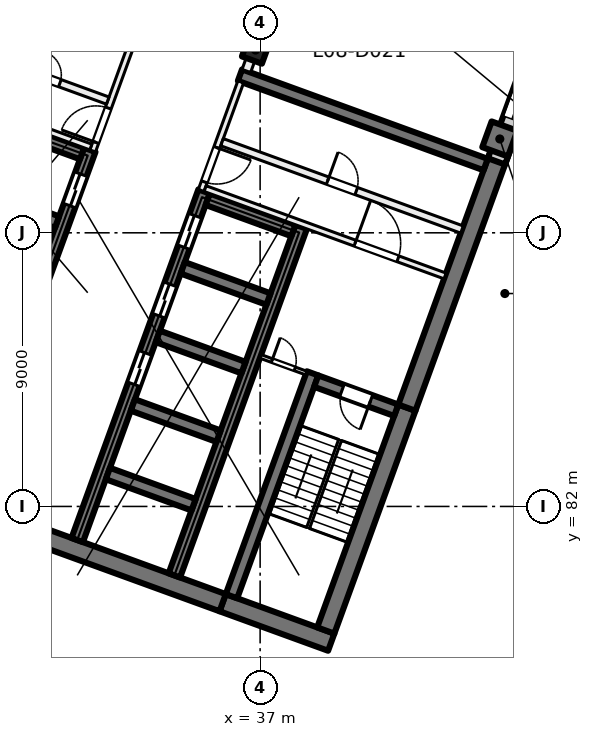
"""IFC4 building model, lengths in metres.
Left out: names, types, materials, properties, quantities, classifications, styles, units other than length and angle.
Written with IfcOpenShell. Run it as: python <this file> out.ifc"""

import sys

from ifc_helpers import new_model, si_unit, direction, frame, frame_2d, origin, origin_2d, place, context, subcontext, project, spatial, rectangle, extrude, element, fill, save


model = new_model("IFC4")
c1 = context("Model", 3, precision=1e-05, world=origin(), true_north=direction((0.0, 1.0)))
c2 = subcontext(c1, "Body", "Model", "MODEL_VIEW")
j1 = project(units=[si_unit("LENGTHUNIT", "METRE"), si_unit("PLANEANGLEUNIT", "RADIAN")], contexts=[c1])
p1 = place(None, origin())
s1 = spatial("IfcSite", under=j1, at=p1, CompositionType="ELEMENT")
p2 = place(p1, origin())
s2 = spatial("IfcBuilding", under=s1, at=p2, CompositionType="ELEMENT")
p3 = place(p2, frame((0.0, 0.0, 39.5)))
s3 = spatial("IfcBuildingStorey", under=s2, at=p3, CompositionType="ELEMENT", Elevation=39.5)
p4 = place(p3, frame((36.849, 97.011, 0.0), z_axis=(0.0, 0.0, 1.0), x_axis=(-0.342020143326, -0.939692620786, 0.0)))
e1 = element("IfcColumn", 1, at=p4, inside=s3, PredefinedType="COLUMN", context=c2, shape_type="SweptSolid", body=[
    extrude(rectangle(XDim=0.7, YDim=0.7, at=origin_2d()), origin(), (0.0, 0.0, 1.0), 4.0),
])
p5 = place(p3, frame((44.884, 94.087, 0.0), z_axis=(0.0, 0.0, 1.0), x_axis=(-0.342020143326, -0.939692620786, 0.0)))
e2 = element("IfcColumn", 2, at=p5, inside=s3, PredefinedType="COLUMN", context=c2, shape_type="SweptSolid", body=[
    extrude(rectangle(XDim=0.9, YDim=0.9, at=origin_2d()), origin(), (0.0, 0.0, 1.0), 4.0),
])
p6 = place(p3, frame((39.338, 77.535, 0.0), z_axis=(0.0, 0.0, 1.0), x_axis=(-0.939701471648, 0.341995824804, 0.0)))
e3 = element("IfcWall", 3, at=p6, inside=s3, PredefinedType="SHEAR", context=c2, shape_type="SweptSolid", body=[
    extrude(rectangle(XDim=3.8, YDim=0.6, at=frame_2d((1.9, 0.0))), origin(), (0.0, 0.0, 1.0), 4.0),
])
p7 = place(p3, frame((35.767, 78.835, 0.0), z_axis=(0.0, 0.0, 1.0), x_axis=(-0.939692894512, 0.342019391267, 0.0)))
e4 = element("IfcWall", 4, at=p7, inside=s3, PredefinedType="SHEAR", context=c2, shape_type="SweptSolid", body=[
    extrude(rectangle(XDim=14.4, YDim=0.6, at=frame_2d((7.2, 0.0))), origin(), (0.0, 0.0, 1.0), 4.0),
])
p8 = place(p3, frame((39.159, 77.92, 0.0), z_axis=(0.0, 0.0, 1.0), x_axis=(0.342016982193, 0.939693771338, 0.0)))
e5 = element("IfcWall", 5, at=p8, inside=s3, PredefinedType="SHEAR", context=c2, shape_type="SweptSolid", body=[
    extrude(rectangle(XDim=7.8, YDim=0.6, at=frame_2d((3.9, 0.0))), origin(), (0.0, 0.0, 1.0), 4.0),
])
p9 = place(p3, frame((41.827, 85.249, 0.0), z_axis=(0.0, 0.0, 1.0), x_axis=(0.342016162452, 0.939694069696, 0.0)))
e6 = element("IfcWall", 6, at=p9, inside=s3, PredefinedType="SHEAR", context=c2, shape_type="SweptSolid", body=[
    extrude(rectangle(XDim=8.9, YDim=0.6, at=frame_2d((4.45, 0.0))), origin(), (0.0, 0.0, 1.0), 4.0),
])
p10 = place(p3, frame((36.058, 79.048, 0.0), z_axis=(0.0, 0.0, 1.0), x_axis=(0.342016982193, 0.939693771338, 0.0)))
e7 = element("IfcWall", 7, at=p10, inside=s3, PredefinedType="SHEAR", context=c2, shape_type="SweptSolid", body=[
    extrude(rectangle(XDim=7.8, YDim=0.4, at=frame_2d((3.9, 0.0))), origin(), (0.0, 0.0, 1.0), 4.0),
])
p11 = place(p3, frame((41.476, 85.164, 0.0), z_axis=(0.0, 0.0, 1.0), x_axis=(-0.939678810556, 0.342058084236, 0.0)))
e8 = element("IfcWall", 8, at=p11, inside=s3, PredefinedType="SHEAR", context=c2, shape_type="SweptSolid", body=[
    extrude(rectangle(XDim=2.8, YDim=0.4, at=frame_2d((1.4, 0.0))), origin(), (0.0, 0.0, 1.0), 4.0),
])
p12 = place(p11, frame((0.9, 0.0, 0.0)))
e9 = element("IfcOpeningElement", 9, at=p12, cuts=e8, PredefinedType="OPENING", context=c2, shape_type="SweptSolid", body=[
    extrude(rectangle(XDim=1.0, YDim=2.1, at=frame_2d((0.5, 1.05))), frame((0.0, 0.21, 0.0), z_axis=(0.0, -1.0, 0.0), x_axis=(1.0, 0.0, 0.0)), (0.0, 0.0, 1.0), 0.42),
])
p13 = place(p3, frame((30.984, 80.895, 0.0), z_axis=(0.0, 0.0, 1.0), x_axis=(0.342021021735, 0.939692301071, 0.0)))
e10 = element("IfcWall", 10, at=p13, inside=s3, PredefinedType="SHEAR", context=c2, shape_type="SweptSolid", body=[
    extrude(rectangle(XDim=12.2, YDim=0.4, at=frame_2d((6.1, 0.0))), origin(), (0.0, 0.0, 1.0), 4.0),
])
p14 = place(p13, frame((5.45, 0.0, 0.0)))
e11 = element("IfcOpeningElement", 11, at=p14, cuts=e10, PredefinedType="OPENING", context=c2, shape_type="SweptSolid", body=[
    extrude(rectangle(XDim=1.1, YDim=2.1, at=frame_2d((0.55, 1.05))), frame((0.0, 0.21, 0.0), z_axis=(0.0, -1.0, 0.0), x_axis=(1.0, 0.0, 0.0)), (0.0, 0.0, 1.0), 0.42),
])
p15 = place(p13, frame((7.85, 0.0, 0.0)))
e12 = element("IfcOpeningElement", 12, at=p15, cuts=e10, PredefinedType="OPENING", context=c2, shape_type="SweptSolid", body=[
    extrude(rectangle(XDim=1.1, YDim=2.1, at=frame_2d((0.55, 1.05))), frame((0.0, 0.21, 0.0), z_axis=(0.0, -1.0, 0.0), x_axis=(1.0, 0.0, 0.0)), (0.0, 0.0, 1.0), 0.42),
])
p16 = place(p13, frame((10.25, 0.0, 0.0)))
e13 = element("IfcOpeningElement", 13, at=p16, cuts=e10, PredefinedType="OPENING", context=c2, shape_type="SweptSolid", body=[
    extrude(rectangle(XDim=1.1, YDim=2.1, at=frame_2d((0.55, 1.05))), frame((0.0, 0.21, 0.0), z_axis=(0.0, -1.0, 0.0), x_axis=(1.0, 0.0, 0.0)), (0.0, 0.0, 1.0), 0.42),
])
p17 = place(p3, frame((34.178, 79.732, 0.0), z_axis=(0.0, 0.0, 1.0), x_axis=(0.342014590177, 0.939694641948, 0.0)))
e14 = element("IfcWall", 14, at=p17, inside=s3, PredefinedType="SHEAR", context=c2, shape_type="SweptSolid", body=[
    extrude(rectangle(XDim=12.2, YDim=0.4, at=frame_2d((6.1, 0.0))), origin(), (0.0, 0.0, 1.0), 4.0),
])
for number, where, z_axis, x_axis in (
    (15, (34.812, 82.056, 0.0), (0.0, 0.0, 1.0), (-0.94, 0.342, 0.0)),
    (16, (35.632, 84.311, 0.0), (0.0, 0.0, 1.0), (-0.94, 0.342, 0.0)),
    (17, (36.453, 86.566, 0.0), (0.0, 0.0, 1.0), (-0.94, 0.342, 0.0)),
    (18, (37.274, 88.822, 0.0), (0.0, 0.0, 1.0), (-0.94, 0.342, 0.0)),
):
    element("IfcWall", number, at=place(p3, frame(where, z_axis=z_axis, x_axis=x_axis)), inside=s3, PredefinedType="SHEAR", context=c2, shape_type="SweptSolid", body=[
        extrude(rectangle(XDim=3.0, YDim=0.4, at=frame_2d((1.5, 0.0))), origin(), (0.0, 0.0, 1.0), 4.0),
    ])
p18 = place(p3, frame((38.095, 91.077, 0.0), z_axis=(0.0, 0.0, 1.0), x_axis=(-0.939676934218, 0.342063238742, 0.0)))
e19 = element("IfcWall", 19, at=p18, inside=s3, PredefinedType="SHEAR", context=c2, shape_type="SweptSolid", body=[
    extrude(rectangle(XDim=3.0, YDim=0.4, at=frame_2d((1.5, 0.0))), origin(), (0.0, 0.0, 1.0), 4.0),
])
p19 = place(p3, frame((27.225, 82.263, 0.0), z_axis=(0.0, 0.0, 1.0), x_axis=(0.342014590177, 0.939694641948, 0.0)))
e20 = element("IfcWall", 20, at=p19, inside=s3, PredefinedType="SHEAR", context=c2, shape_type="SweptSolid", body=[
    extrude(rectangle(XDim=12.2, YDim=0.4, at=frame_2d((6.1, 0.0))), origin(), (0.0, 0.0, 1.0), 4.0),
])
p20 = place(p19, frame((10.25, 0.0, 0.0)))
e21 = element("IfcOpeningElement", 21, at=p20, cuts=e20, PredefinedType="OPENING", context=c2, shape_type="SweptSolid", body=[
    extrude(rectangle(XDim=1.1, YDim=2.1, at=frame_2d((0.55, 1.05))), frame((0.0, 0.21, 0.0), z_axis=(0.0, -1.0, 0.0), x_axis=(1.0, 0.0, 0.0)), (0.0, 0.0, 1.0), 0.42),
])
p21 = place(p19, frame((0.7, 0.0, 0.0)))
e22 = element("IfcOpeningElement", 22, at=p21, cuts=e20, PredefinedType="OPENING", context=c2, shape_type="SweptSolid", body=[
    extrude(rectangle(XDim=0.8, YDim=2.1, at=frame_2d((0.4, 1.05))), frame((0.0, 0.21, 0.0), z_axis=(0.0, -1.0, 0.0), x_axis=(1.0, 0.0, 0.0)), (0.0, 0.0, 1.0), 0.42),
])
for number, where, z_axis, x_axis in (
    (23, (30.32, 91.353, 0.0), (0.0, 0.0, 1.0), (-0.94, 0.342, 0.0)),
    (24, (31.141, 93.608, 0.0), (0.0, 0.0, 1.0), (-0.94, 0.342, 0.0)),
):
    element("IfcWall", number, at=place(p3, frame(where, z_axis=z_axis, x_axis=x_axis)), inside=s3, PredefinedType="SHEAR", context=c2, shape_type="SweptSolid", body=[
        extrude(rectangle(XDim=3.0, YDim=0.4, at=frame_2d((1.5, 0.0))), origin(), (0.0, 0.0, 1.0), 4.0),
    ])
p22 = place(p3, frame((44.418, 93.245, 0.0), z_axis=(0.0, 0.0, 1.0), x_axis=(-0.93969060187, 0.342025690201, 0.0)))
e25 = element("IfcWall", 25, at=p22, inside=s3, PredefinedType="SHEAR", context=c2, shape_type="SweptSolid", body=[
    extrude(rectangle(XDim=8.6, YDim=0.4, at=frame_2d((4.3, 0.0))), origin(), (0.0, 0.0, 1.0), 4.0),
])
p23 = place(p3, frame((52.212, 113.783, 0.0), z_axis=(0.0, 0.0, 1.0), x_axis=(-0.34202521188, -0.939690775968, 0.0)))
e26 = element("IfcWall", 26, at=p23, inside=s3, PredefinedType="SOLIDWALL", context=c2, shape_type="SweptSolid", body=[
    extrude(rectangle(XDim=21.745, YDim=0.6, at=frame_2d((10.873, 0.0))), origin(), (0.0, 0.0, 1.0), 3.625),
])
p24 = place(p23, frame((3.765, 0.0, 0.9)))
e27 = element("IfcOpeningElement", 27, at=p24, cuts=e26, PredefinedType="OPENING", context=c2, shape_type="SweptSolid", body=[
    extrude(rectangle(XDim=3.0, YDim=2.4, at=frame_2d((1.5, 1.2))), frame((0.0, 0.31, 0.0), z_axis=(0.0, -1.0, 0.0), x_axis=(1.0, 0.0, 0.0)), (0.0, 0.0, 1.0), 0.62),
])
p25 = place(p23, frame((8.265, 0.0, 0.9)))
e28 = element("IfcOpeningElement", 28, at=p25, cuts=e26, PredefinedType="OPENING", context=c2, shape_type="SweptSolid", body=[
    extrude(rectangle(XDim=3.0, YDim=2.4, at=frame_2d((1.5, 1.2))), frame((0.0, 0.31, 0.0), z_axis=(0.0, -1.0, 0.0), x_axis=(1.0, 0.0, 0.0)), (0.0, 0.0, 1.0), 0.62),
])
p26 = place(p23, frame((12.765, 0.0, 0.9)))
e29 = element("IfcOpeningElement", 29, at=p26, cuts=e26, PredefinedType="OPENING", context=c2, shape_type="SweptSolid", body=[
    extrude(rectangle(XDim=3.0, YDim=2.4, at=frame_2d((1.5, 1.2))), frame((0.0, 0.31, 0.0), z_axis=(0.0, -1.0, 0.0), x_axis=(1.0, 0.0, 0.0)), (0.0, 0.0, 1.0), 0.62),
])
p27 = place(p23, frame((17.265, 0.0, 0.9)))
e30 = element("IfcOpeningElement", 30, at=p27, cuts=e26, PredefinedType="OPENING", context=c2, shape_type="SweptSolid", body=[
    extrude(rectangle(XDim=3.0, YDim=2.4, at=frame_2d((1.5, 1.2))), frame((0.0, 0.31, 0.0), z_axis=(0.0, -1.0, 0.0), x_axis=(1.0, 0.0, 0.0)), (0.0, 0.0, 1.0), 0.62),
])
p28 = place(p3, frame((31.491, 93.693, 0.0), z_axis=(0.0, 0.0, 1.0), x_axis=(0.341995824804, 0.939701471648, 0.0)))
e31 = element("IfcWall", 31, at=p28, inside=s3, PredefinedType="PARTITIONING", context=c2, shape_type="SweptSolid", body=[
    extrude(rectangle(XDim=3.8, YDim=0.2, at=frame_2d((1.9, 0.0))), origin(), (0.0, 0.0, 1.0), 3.625),
])
p29 = place(p28, frame((0.3, 0.0, 0.0)))
e32 = element("IfcOpeningElement", 32, at=p29, cuts=e31, PredefinedType="OPENING", context=c2, shape_type="SweptSolid", body=[
    extrude(rectangle(XDim=1.2, YDim=2.1, at=frame_2d((0.6, 1.05))), frame((0.0, 0.11, 0.0), z_axis=(0.0, -1.0, 0.0), x_axis=(1.0, 0.0, 0.0)), (0.0, 0.0, 1.0), 0.22),
])
p30 = place(p3, frame((23.538, 96.694, 0.0), z_axis=(0.0, 0.0, 1.0), x_axis=(0.939691552312, -0.342023078919, 0.0)))
e33 = element("IfcWall", 33, at=p30, inside=s3, PredefinedType="PARTITIONING", context=c2, shape_type="SweptSolid", body=[
    extrude(rectangle(XDim=8.4, YDim=0.2, at=frame_2d((4.2, 0.0))), origin(), (0.0, 0.0, 1.0), 3.625),
])
p31 = place(p30, frame((1.65, 0.0, 0.0)))
e34 = element("IfcOpeningElement", 34, at=p31, cuts=e33, PredefinedType="OPENING", context=c2, shape_type="SweptSolid", body=[
    extrude(rectangle(XDim=1.5, YDim=2.1, at=frame_2d((0.75, 1.05))), frame((0.0, 0.11, 0.0), z_axis=(0.0, -1.0, 0.0), x_axis=(1.0, 0.0, 0.0)), (0.0, 0.0, 1.0), 0.22),
])
p32 = place(p3, frame((24.094, 98.221, 0.0), z_axis=(0.0, 0.0, 1.0), x_axis=(0.939691552312, -0.342023078919, 0.0)))
e35 = element("IfcWall", 35, at=p32, inside=s3, PredefinedType="PARTITIONING", context=c2, shape_type="SweptSolid", body=[
    extrude(rectangle(XDim=8.4, YDim=0.25, at=frame_2d((4.2, 0.0))), origin(), (0.0, 0.0, 1.0), 3.625),
])
p33 = place(p32, frame((5.925, 0.0, 0.0)))
e36 = element("IfcOpeningElement", 36, at=p33, cuts=e35, PredefinedType="OPENING", context=c2, shape_type="SweptSolid", body=[
    extrude(rectangle(XDim=0.8, YDim=2.1, at=frame_2d((0.4, 1.05))), frame((0.0, 0.135, 0.0), z_axis=(0.0, -1.0, 0.0), x_axis=(1.0, 0.0, 0.0)), (0.0, 0.0, 1.0), 0.27),
])
p34 = place(p32, frame((1.675, 0.0, 0.0)))
e37 = element("IfcOpeningElement", 37, at=p34, cuts=e35, PredefinedType="OPENING", context=c2, shape_type="SweptSolid", body=[
    extrude(rectangle(XDim=0.8, YDim=2.1, at=frame_2d((0.4, 1.05))), frame((0.0, 0.135, 0.0), z_axis=(0.0, -1.0, 0.0), x_axis=(1.0, 0.0, 0.0)), (0.0, 0.0, 1.0), 0.27),
])
p35 = place(p3, frame((36.362, 95.964, 0.0), z_axis=(0.0, 0.0, 1.0), x_axis=(-0.341995824804, -0.939701471648, 0.0)))
e38 = element("IfcWall", 38, at=p35, inside=s3, PredefinedType="PARTITIONING", context=c2, shape_type="SweptSolid", body=[
    extrude(rectangle(XDim=3.8, YDim=0.2, at=frame_2d((1.9, 0.0))), origin(), (0.0, 0.0, 1.0), 3.625),
])
p36 = place(p35, frame((2.3, 0.0, 0.0)))
e39 = element("IfcOpeningElement", 39, at=p36, cuts=e38, PredefinedType="OPENING", context=c2, shape_type="SweptSolid", body=[
    extrude(rectangle(XDim=1.2, YDim=2.1, at=frame_2d((0.6, 1.05))), frame((0.0, 0.11, 0.0), z_axis=(0.0, -1.0, 0.0), x_axis=(1.0, 0.0, 0.0)), (0.0, 0.0, 1.0), 0.22),
])
p37 = place(p3, frame((35.19, 92.453, 0.0), z_axis=(0.0, 0.0, 1.0), x_axis=(0.939691552312, -0.342023078919, 0.0)))
e40 = element("IfcWall", 40, at=p37, inside=s3, PredefinedType="PARTITIONING", context=c2, shape_type="SweptSolid", body=[
    extrude(rectangle(XDim=8.4, YDim=0.2, at=frame_2d((4.2, 0.0))), origin(), (0.0, 0.0, 1.0), 3.625),
])
p38 = place(p37, frame((5.25, 0.0, 0.0)))
e41 = element("IfcOpeningElement", 41, at=p38, cuts=e40, PredefinedType="OPENING", context=c2, shape_type="SweptSolid", body=[
    extrude(rectangle(XDim=1.5, YDim=2.1, at=frame_2d((0.75, 1.05))), frame((0.0, 0.11, 0.0), z_axis=(0.0, -1.0, 0.0), x_axis=(1.0, 0.0, 0.0)), (0.0, 0.0, 1.0), 0.22),
])
p39 = place(p3, frame((35.746, 93.98, 0.0), z_axis=(0.0, 0.0, 1.0), x_axis=(0.939691552312, -0.342023078919, 0.0)))
e42 = element("IfcWall", 42, at=p39, inside=s3, PredefinedType="PARTITIONING", context=c2, shape_type="SweptSolid", body=[
    extrude(rectangle(XDim=8.4, YDim=0.25, at=frame_2d((4.2, 0.0))), origin(), (0.0, 0.0, 1.0), 3.625),
])
p40 = place(p39, frame((3.7, 0.0, 0.0)))
e43 = element("IfcOpeningElement", 43, at=p40, cuts=e42, PredefinedType="OPENING", context=c2, shape_type="SweptSolid", body=[
    extrude(rectangle(XDim=1.0, YDim=2.1, at=frame_2d((0.5, 1.05))), frame((0.0, 0.135, 0.0), z_axis=(0.0, -1.0, 0.0), x_axis=(1.0, 0.0, 0.0)), (0.0, 0.0, 1.0), 0.27),
])
p41 = place(p3, frame((37.013, 86.935, 0.0), z_axis=(0.0, 0.0, 1.0), x_axis=(0.939659694648, -0.342110593602, 0.0)))
e44 = element("IfcWall", 44, at=p41, inside=s3, PredefinedType="PARTITIONING", context=c2, shape_type="SweptSolid", body=[
    extrude(rectangle(XDim=1.6, YDim=0.125, at=frame_2d((0.8, 0.0))), origin(), (0.0, 0.0, 1.0), 3.625),
])
p42 = place(p41, frame((0.4, 0.0, 0.0)))
e45 = element("IfcOpeningElement", 45, at=p42, cuts=e44, PredefinedType="OPENING", context=c2, shape_type="SweptSolid", body=[
    extrude(rectangle(XDim=0.8, YDim=2.1, at=frame_2d((0.4, 1.05))), frame((0.0, 0.073, 0.0), z_axis=(0.0, -1.0, 0.0), x_axis=(1.0, 0.0, 0.0)), (0.0, 0.0, 1.0), 0.145),
])
p43 = place(p3, frame((44.612, 118.483, 0.0), z_axis=(0.0, 0.0, 1.0), x_axis=(-0.342043123066, -0.939684256526, 0.0)))
e46 = element("IfcWall", 46, at=p43, inside=s3, PredefinedType="PARTITIONING", context=c2, shape_type="SweptSolid", body=[
    extrude(rectangle(XDim=23.582, YDim=0.3, at=frame_2d((11.791, 0.0))), origin(), (0.0, 0.0, 1.0), 3.625),
])
p44 = place(p43, frame((14.932, 0.0, 0.0)))
e47 = element("IfcOpeningElement", 47, at=p44, cuts=e46, PredefinedType="OPENING", context=c2, shape_type="SweptSolid", body=[
    extrude(rectangle(XDim=0.8, YDim=2.1, at=frame_2d((0.4, 1.05))), frame((0.0, 0.16, 0.0), z_axis=(0.0, -1.0, 0.0), x_axis=(1.0, 0.0, 0.0)), (0.0, 0.0, 1.0), 0.32),
])
p45 = place(p43, frame((10.982, 0.0, 0.0)))
e48 = element("IfcOpeningElement", 48, at=p45, cuts=e46, PredefinedType="OPENING", context=c2, shape_type="SweptSolid", body=[
    extrude(rectangle(XDim=1.2, YDim=2.1, at=frame_2d((0.6, 1.05))), frame((0.0, 0.16, 0.0), z_axis=(0.0, -1.0, 0.0), x_axis=(1.0, 0.0, 0.0)), (0.0, 0.0, 1.0), 0.32),
])
p46 = place(p43, frame((19.307, 0.0, 0.0)))
e49 = element("IfcOpeningElement", 49, at=p46, cuts=e46, PredefinedType="OPENING", context=c2, shape_type="SweptSolid", body=[
    extrude(rectangle(XDim=1.8, YDim=2.1, at=frame_2d((0.9, 1.05))), frame((0.0, 0.16, 0.0), z_axis=(0.0, -1.0, 0.0), x_axis=(1.0, 0.0, 0.0)), (0.0, 0.0, 1.0), 0.32),
])
p47 = place(p43, frame((5.756, 0.0, 0.0)))
e50 = element("IfcOpeningElement", 50, at=p47, cuts=e46, PredefinedType="OPENING", context=c2, shape_type="SweptSolid", body=[
    extrude(rectangle(XDim=1.8, YDim=2.1, at=frame_2d((0.9, 1.05))), frame((0.0, 0.16, 0.0), z_axis=(0.0, -1.0, 0.0), x_axis=(1.0, 0.0, 0.0)), (0.0, 0.0, 1.0), 0.32),
])
p48 = place(p27, origin())
e51 = element("IfcWindow", 51, at=p48, inside=s3, PartitioningType="SINGLE_PANEL", PredefinedType="WINDOW", context=c2, shape_type="SweptSolid", body=[
    extrude(rectangle(XDim=3.0, YDim=2.4, at=frame_2d((1.5, 1.2))), frame((0.0, 0.03, 0.0), z_axis=(0.0, -1.0, 0.0), x_axis=(1.0, 0.0, 0.0)), (0.0, 0.0, 1.0), 0.06),
])
fill(e30, e51)
p49 = place(p20, origin())
e52 = element("IfcDoor", 52, at=p49, inside=s3, OperationType="DOUBLE_DOOR_SLIDING", PredefinedType="DOOR", context=c2, shape_type="SweptSolid", body=[
    extrude(rectangle(XDim=1.1, YDim=2.1, at=frame_2d((0.55, 1.05))), frame((0.0, 0.025, 0.0), z_axis=(0.0, -1.0, 0.0), x_axis=(1.0, 0.0, 0.0)), (0.0, 0.0, 1.0), 0.05),
])
fill(e21, e52)
p50 = place(p14, origin())
e53 = element("IfcDoor", 53, at=p50, inside=s3, OperationType="DOUBLE_DOOR_SLIDING", PredefinedType="DOOR", context=c2, shape_type="SweptSolid", body=[
    extrude(rectangle(XDim=1.1, YDim=2.1, at=frame_2d((0.55, 1.05))), frame((0.0, 0.025, 0.0), z_axis=(0.0, -1.0, 0.0), x_axis=(1.0, 0.0, 0.0)), (0.0, 0.0, 1.0), 0.05),
])
fill(e11, e53)
p51 = place(p15, origin())
e54 = element("IfcDoor", 54, at=p51, inside=s3, OperationType="DOUBLE_DOOR_SLIDING", PredefinedType="DOOR", context=c2, shape_type="SweptSolid", body=[
    extrude(rectangle(XDim=1.1, YDim=2.1, at=frame_2d((0.55, 1.05))), frame((0.0, 0.025, 0.0), z_axis=(0.0, -1.0, 0.0), x_axis=(1.0, 0.0, 0.0)), (0.0, 0.0, 1.0), 0.05),
])
fill(e12, e54)
p52 = place(p16, origin())
e55 = element("IfcDoor", 55, at=p52, inside=s3, OperationType="DOUBLE_DOOR_SLIDING", PredefinedType="DOOR", context=c2, shape_type="SweptSolid", body=[
    extrude(rectangle(XDim=1.1, YDim=2.1, at=frame_2d((0.55, 1.05))), frame((0.0, 0.025, 0.0), z_axis=(0.0, -1.0, 0.0), x_axis=(1.0, 0.0, 0.0)), (0.0, 0.0, 1.0), 0.05),
])
fill(e13, e55)
p53 = place(p29, origin())
e56 = element("IfcDoor", 56, at=p53, inside=s3, OperationType="DOUBLE_DOOR_SINGLE_SWING", PredefinedType="DOOR", context=c2, shape_type="SweptSolid", body=[
    extrude(rectangle(XDim=1.2, YDim=2.1, at=frame_2d((0.6, 1.05))), frame((0.0, 0.025, 0.0), z_axis=(0.0, -1.0, 0.0), x_axis=(1.0, 0.0, 0.0)), (0.0, 0.0, 1.0), 0.05),
])
fill(e32, e56)
p54 = place(p33, origin())
e57 = element("IfcDoor", 57, at=p54, inside=s3, OperationType="SINGLE_SWING_LEFT", PredefinedType="DOOR", context=c2, shape_type="SweptSolid", body=[
    extrude(rectangle(XDim=0.8, YDim=2.1, at=frame_2d((0.4, 1.05))), frame((0.0, 0.025, 0.0), z_axis=(0.0, -1.0, 0.0), x_axis=(1.0, 0.0, 0.0)), (0.0, 0.0, 1.0), 0.05),
])
fill(e36, e57)
p55 = place(p36, origin())
e58 = element("IfcDoor", 58, at=p55, inside=s3, OperationType="DOUBLE_DOOR_SINGLE_SWING", PredefinedType="DOOR", context=c2, shape_type="SweptSolid", body=[
    extrude(rectangle(XDim=1.2, YDim=2.1, at=frame_2d((0.6, 1.05))), frame((0.0, 0.025, 0.0), z_axis=(0.0, -1.0, 0.0), x_axis=(1.0, 0.0, 0.0)), (0.0, 0.0, 1.0), 0.05),
])
fill(e39, e58)
p56 = place(p38, origin())
e59 = element("IfcDoor", 59, at=p56, inside=s3, OperationType="DOUBLE_DOOR_SINGLE_SWING", PredefinedType="DOOR", context=c2, shape_type="SweptSolid", body=[
    extrude(rectangle(XDim=1.5, YDim=2.1, at=frame_2d((0.75, 1.05))), frame((0.0, 0.025, 0.0), z_axis=(0.0, -1.0, 0.0), x_axis=(1.0, 0.0, 0.0)), (0.0, 0.0, 1.0), 0.05),
])
fill(e41, e59)
p57 = place(p12, origin())
e60 = element("IfcDoor", 60, at=p57, inside=s3, OperationType="SINGLE_SWING_RIGHT", PredefinedType="DOOR", context=c2, shape_type="SweptSolid", body=[
    extrude(rectangle(XDim=1.0, YDim=2.1, at=frame_2d((0.5, 1.05))), frame((0.0, 0.025, 0.0), z_axis=(0.0, -1.0, 0.0), x_axis=(1.0, 0.0, 0.0)), (0.0, 0.0, 1.0), 0.05),
])
fill(e9, e60)
p58 = place(p42, origin())
e61 = element("IfcDoor", 61, at=p58, inside=s3, OperationType="SINGLE_SWING_LEFT", PredefinedType="DOOR", context=c2, shape_type="SweptSolid", body=[
    extrude(rectangle(XDim=0.8, YDim=2.1, at=frame_2d((0.4, 1.05))), frame((0.0, 0.025, 0.0), z_axis=(0.0, -1.0, 0.0), x_axis=(1.0, 0.0, 0.0)), (0.0, 0.0, 1.0), 0.05),
])
fill(e45, e61)
p59 = place(p40, origin())
e62 = element("IfcDoor", 62, at=p59, inside=s3, OperationType="SINGLE_SWING_RIGHT", PredefinedType="DOOR", context=c2, shape_type="SweptSolid", body=[
    extrude(rectangle(XDim=1.0, YDim=2.1, at=frame_2d((0.5, 1.05))), frame((0.0, 0.025, 0.0), z_axis=(0.0, -1.0, 0.0), x_axis=(1.0, 0.0, 0.0)), (0.0, 0.0, 1.0), 0.05),
])
fill(e43, e62)
save(model, sys.argv[1])
